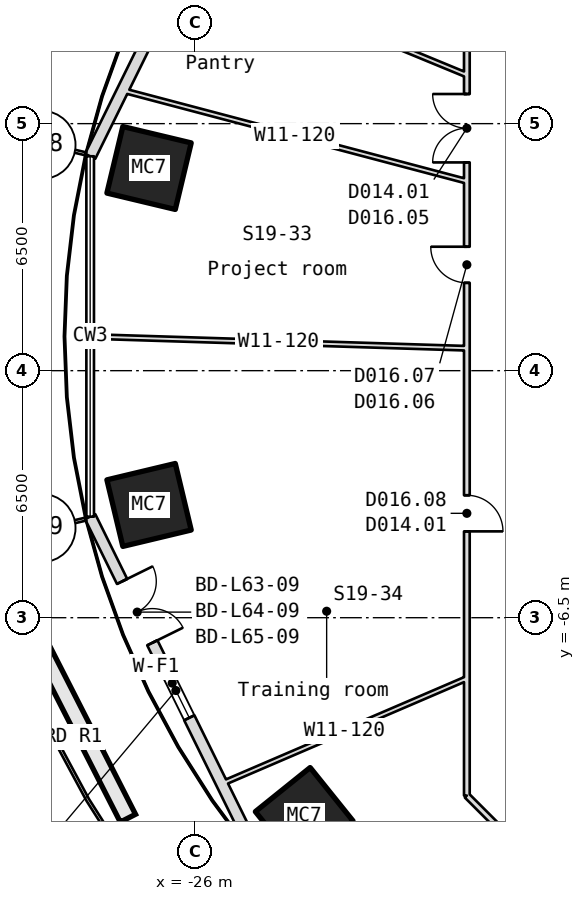
"""IFC4 building model, lengths in metres.
Left out: names, types, materials, properties, quantities, classifications, styles, units other than length and angle.
Written with IfcOpenShell. Run it as: python <this file> out.ifc"""

import sys

from ifc_helpers import new_model, si_unit, direction, frame, frame_2d, origin, origin_2d, place, context, subcontext, project, spatial, rectangle, hollow_rectangle, extrude, element, fill, save


model = new_model("IFC4")
c1 = context("Model", 3, precision=1e-05, world=origin(), true_north=direction((0.0, 1.0)))
c2 = subcontext(c1, "Body", "Model", "MODEL_VIEW")
j1 = project(units=[si_unit("LENGTHUNIT", "METRE"), si_unit("PLANEANGLEUNIT", "RADIAN")], contexts=[c1])
p1 = place(None, origin())
s1 = spatial("IfcSite", under=j1, at=p1, CompositionType="ELEMENT")
p2 = place(p1, origin())
s2 = spatial("IfcBuilding", under=s1, at=p2, CompositionType="ELEMENT")
p3 = place(p2, frame((0.0, 0.0, 284.5)))
s3 = spatial("IfcBuildingStorey", under=s2, at=p3, CompositionType="ELEMENT", Elevation=284.5)
for number, where, z_axis, x_axis in (
    (1, (-27.213, 5.333, -0.18), (0.0, 0.0, 1.0), (0.233, 0.973, 0.0)),
    (2, (-27.213, -3.533, -0.18), (0.0, 0.0, 1.0), (-0.233, 0.973, 0.0)),
    (3, (-23.131, -11.724, -0.18), (0.0, 0.0, 1.0), (-0.627, 0.779, 0.0)),
):
    element("IfcColumn", number, at=place(p3, frame(where, z_axis=z_axis, x_axis=x_axis)), inside=s3, PredefinedType="COLUMN", context=c2, shape_type="SweptSolid", body=[
        extrude(hollow_rectangle(XDim=1.8, YDim=1.85, WallThickness=0.06, at=origin_2d()), origin(), (0.0, 0.0, 1.0), 4.15),
    ])
p4 = place(p3, frame((-24.444, 14.402, 0.0), z_axis=(0.0, 0.0, 1.0), x_axis=(-0.442086999908, -0.896972175997, 0.0)))
e4 = element("IfcWall", 4, at=p4, inside=s3, PredefinedType="SOLIDWALL", context=c2, shape_type="SweptSolid", body=[
    extrude(rectangle(XDim=9.767, YDim=0.3, at=frame_2d((4.884, 0.0))), origin(), (0.0, 0.0, 1.0), 3.97),
])
p5 = place(p4, frame((1.9, 0.0, 0.0)))
e5 = element("IfcOpeningElement", 5, at=p5, cuts=e4, PredefinedType="OPENING", context=c2, shape_type="SweptSolid", body=[
    extrude(rectangle(XDim=1.8, YDim=2.4, at=frame_2d((0.9, 1.2))), frame((0.0, 0.16, 0.0), z_axis=(0.0, -1.0, 0.0), x_axis=(1.0, 0.0, 0.0)), (0.0, 0.0, 1.0), 0.32),
])
p6 = place(p4, frame((4.3, 0.0, 0.9)))
e6 = element("IfcOpeningElement", 6, at=p6, cuts=e4, PredefinedType="OPENING", context=c2, shape_type="SweptSolid", body=[
    extrude(rectangle(XDim=1.6, YDim=1.5, at=frame_2d((0.8, 0.75))), frame((0.0, 0.16, 0.0), z_axis=(0.0, -1.0, 0.0), x_axis=(1.0, 0.0, 0.0)), (0.0, 0.0, 1.0), 0.32),
])
p7 = place(p3, frame((-28.762, -3.841, 0.0), z_axis=(0.0, 0.0, 1.0), x_axis=(0.442086999908, -0.896972175997, 0.0)))
e7 = element("IfcWall", 7, at=p7, inside=s3, PredefinedType="SOLIDWALL", context=c2, shape_type="SweptSolid", body=[
    extrude(rectangle(XDim=9.767, YDim=0.3, at=frame_2d((4.884, 0.0))), origin(), (0.0, 0.0, 1.0), 3.97),
])
p8 = place(p7, frame((1.9, 0.0, 0.0)))
e8 = element("IfcOpeningElement", 8, at=p8, cuts=e7, PredefinedType="OPENING", context=c2, shape_type="SweptSolid", body=[
    extrude(rectangle(XDim=1.8, YDim=2.4, at=frame_2d((0.9, 1.2))), frame((0.0, 0.16, 0.0), z_axis=(0.0, -1.0, 0.0), x_axis=(1.0, 0.0, 0.0)), (0.0, 0.0, 1.0), 0.32),
])
p9 = place(p7, frame((4.3, 0.0, 0.9)))
e9 = element("IfcOpeningElement", 9, at=p9, cuts=e7, PredefinedType="OPENING", context=c2, shape_type="SweptSolid", body=[
    extrude(rectangle(XDim=1.6, YDim=1.5, at=frame_2d((0.8, 0.75))), frame((0.0, 0.16, 0.0), z_axis=(0.0, -1.0, 0.0), x_axis=(1.0, 0.0, 0.0)), (0.0, 0.0, 1.0), 0.32),
])
p10 = place(p3, frame((-18.85, -11.18, 0.0), z_axis=(0.0, 0.0, 1.0), x_axis=(0.0, 1.0, 0.0)))
e10 = element("IfcWall", 10, at=p10, inside=s3, PredefinedType="PARTITIONING", context=c2, shape_type="SweptSolid", body=[
    extrude(rectangle(XDim=22.361, YDim=0.15, at=frame_2d((11.18, 0.0))), origin(), (0.0, 0.0, 1.0), 3.97),
])
p11 = place(p10, frame((16.66, 0.0, 0.0)))
e11 = element("IfcOpeningElement", 11, at=p11, cuts=e10, PredefinedType="OPENING", context=c2, shape_type="SweptSolid", body=[
    extrude(rectangle(XDim=1.8, YDim=2.1, at=frame_2d((0.9, 1.05))), frame((0.0, 0.085, 0.0), z_axis=(0.0, -1.0, 0.0), x_axis=(1.0, 0.0, 0.0)), (0.0, 0.0, 1.0), 0.17),
])
p12 = place(p10, frame((13.492, 0.0, 0.0)))
e12 = element("IfcOpeningElement", 12, at=p12, cuts=e10, PredefinedType="OPENING", context=c2, shape_type="SweptSolid", body=[
    extrude(rectangle(XDim=0.95, YDim=2.1, at=frame_2d((0.475, 1.05))), frame((0.0, 0.085, 0.0), z_axis=(0.0, -1.0, 0.0), x_axis=(1.0, 0.0, 0.0)), (0.0, 0.0, 1.0), 0.17),
])
p13 = place(p10, frame((6.952, 0.0, 0.0)))
e13 = element("IfcOpeningElement", 13, at=p13, cuts=e10, PredefinedType="OPENING", context=c2, shape_type="SweptSolid", body=[
    extrude(rectangle(XDim=0.95, YDim=2.1, at=frame_2d((0.475, 1.05))), frame((0.0, 0.085, 0.0), z_axis=(0.0, -1.0, 0.0), x_axis=(1.0, 0.0, 0.0)), (0.0, 0.0, 1.0), 0.17),
])
p14 = place(p3, frame((-18.85, -8.097, 0.0), z_axis=(0.0, 0.0, 1.0), x_axis=(-0.918819078181, -0.394678985468, 0.0)))
e14 = element("IfcWall", 14, at=p14, inside=s3, PredefinedType="PARTITIONING", context=c2, shape_type="SweptSolid", body=[
    extrude(rectangle(XDim=7.019, YDim=0.12, at=frame_2d((3.51, 0.0))), origin(), (0.0, 0.0, 1.0), 3.97),
])
p15 = place(p3, frame((-18.85, 0.59, 0.0), z_axis=(0.0, 0.0, 1.0), x_axis=(-0.999511114892, 0.031265495466, 0.0)))
e15 = element("IfcWall", 15, at=p15, inside=s3, PredefinedType="PARTITIONING", context=c2, shape_type="SweptSolid", body=[
    extrude(rectangle(XDim=9.917, YDim=0.12, at=frame_2d((4.958, 0.0))), origin(), (0.0, 0.0, 1.0), 3.97),
])
p16 = place(p3, frame((-18.85, 4.982, 0.0), z_axis=(0.0, 0.0, 1.0), x_axis=(-0.96680393986, 0.255519357134, 0.0)))
e16 = element("IfcWall", 16, at=p16, inside=s3, PredefinedType="PARTITIONING", context=c2, shape_type="SweptSolid", body=[
    extrude(rectangle(XDim=9.368, YDim=0.12, at=frame_2d((4.684, 0.0))), origin(), (0.0, 0.0, 1.0), 3.97),
])
p17 = place(p3, frame((-18.85, 7.777, 0.0), z_axis=(0.0, 0.0, 1.0), x_axis=(-0.924418879756, 0.381378728759, 0.0)))
e17 = element("IfcWall", 17, at=p17, inside=s3, PredefinedType="PARTITIONING", context=c2, shape_type="SweptSolid", body=[
    extrude(rectangle(XDim=7.965, YDim=0.12, at=frame_2d((3.982, 0.0))), origin(), (0.0, 0.0, 1.0), 3.97),
])
p18 = place(p3, frame((-14.18, -15.85, 0.0), z_axis=(0.0, 0.0, 1.0), x_axis=(-0.707106781187, 0.707106781187, 0.0)))
e18 = element("IfcWall", 18, at=p18, inside=s3, PredefinedType="PARTITIONING", context=c2, shape_type="SweptSolid", body=[
    extrude(rectangle(XDim=6.604, YDim=0.15, at=frame_2d((3.302, 0.0))), origin(), (0.0, 0.0, 1.0), 3.97),
])
p19 = place(p8, origin())
e19 = element("IfcDoor", 19, at=p19, inside=s3, OperationType="SINGLE_SWING_LEFT", PredefinedType="DOOR", context=c2, shape_type="SweptSolid", body=[
    extrude(rectangle(XDim=1.8, YDim=2.4, at=frame_2d((0.9, 1.2))), frame((0.0, 0.025, 0.0), z_axis=(0.0, -1.0, 0.0), x_axis=(1.0, 0.0, 0.0)), (0.0, 0.0, 1.0), 0.05),
])
fill(e8, e19)
p20 = place(p9, origin())
e20 = element("IfcWindow", 20, at=p20, inside=s3, PartitioningType="SINGLE_PANEL", PredefinedType="WINDOW", context=c2, shape_type="SweptSolid", body=[
    extrude(rectangle(XDim=1.6, YDim=1.5, at=frame_2d((0.8, 0.75))), frame((0.0, 0.03, 0.0), z_axis=(0.0, -1.0, 0.0), x_axis=(1.0, 0.0, 0.0)), (0.0, 0.0, 1.0), 0.06),
])
fill(e9, e20)
p21 = place(p11, origin())
e21 = element("IfcDoor", 21, at=p21, inside=s3, OperationType="DOUBLE_DOOR_SINGLE_SWING", PredefinedType="DOOR", context=c2, shape_type="SweptSolid", body=[
    extrude(rectangle(XDim=1.8, YDim=2.1, at=frame_2d((0.9, 1.05))), frame((0.0, 0.025, 0.0), z_axis=(0.0, -1.0, 0.0), x_axis=(1.0, 0.0, 0.0)), (0.0, 0.0, 1.0), 0.05),
])
fill(e11, e21)
p22 = place(p12, origin())
e22 = element("IfcDoor", 22, at=p22, inside=s3, OperationType="SINGLE_SWING_RIGHT", PredefinedType="DOOR", context=c2, shape_type="SweptSolid", body=[
    extrude(rectangle(XDim=0.95, YDim=2.1, at=frame_2d((0.475, 1.05))), frame((0.0, 0.025, 0.0), z_axis=(0.0, -1.0, 0.0), x_axis=(1.0, 0.0, 0.0)), (0.0, 0.0, 1.0), 0.05),
])
fill(e12, e22)
p23 = place(p13, frame((0.95, 0.0, 0.0), z_axis=(0.0, 0.0, 1.0), x_axis=(-1.0, 0.0, 0.0)))
e23 = element("IfcDoor", 23, at=p23, inside=s3, OperationType="SINGLE_SWING_LEFT", PredefinedType="DOOR", context=c2, shape_type="SweptSolid", body=[
    extrude(rectangle(XDim=0.95, YDim=2.1, at=frame_2d((0.475, 1.05))), frame((0.0, 0.025, 0.0), z_axis=(0.0, -1.0, 0.0), x_axis=(1.0, 0.0, 0.0)), (0.0, 0.0, 1.0), 0.05),
])
fill(e13, e23)
save(model, sys.argv[1])
